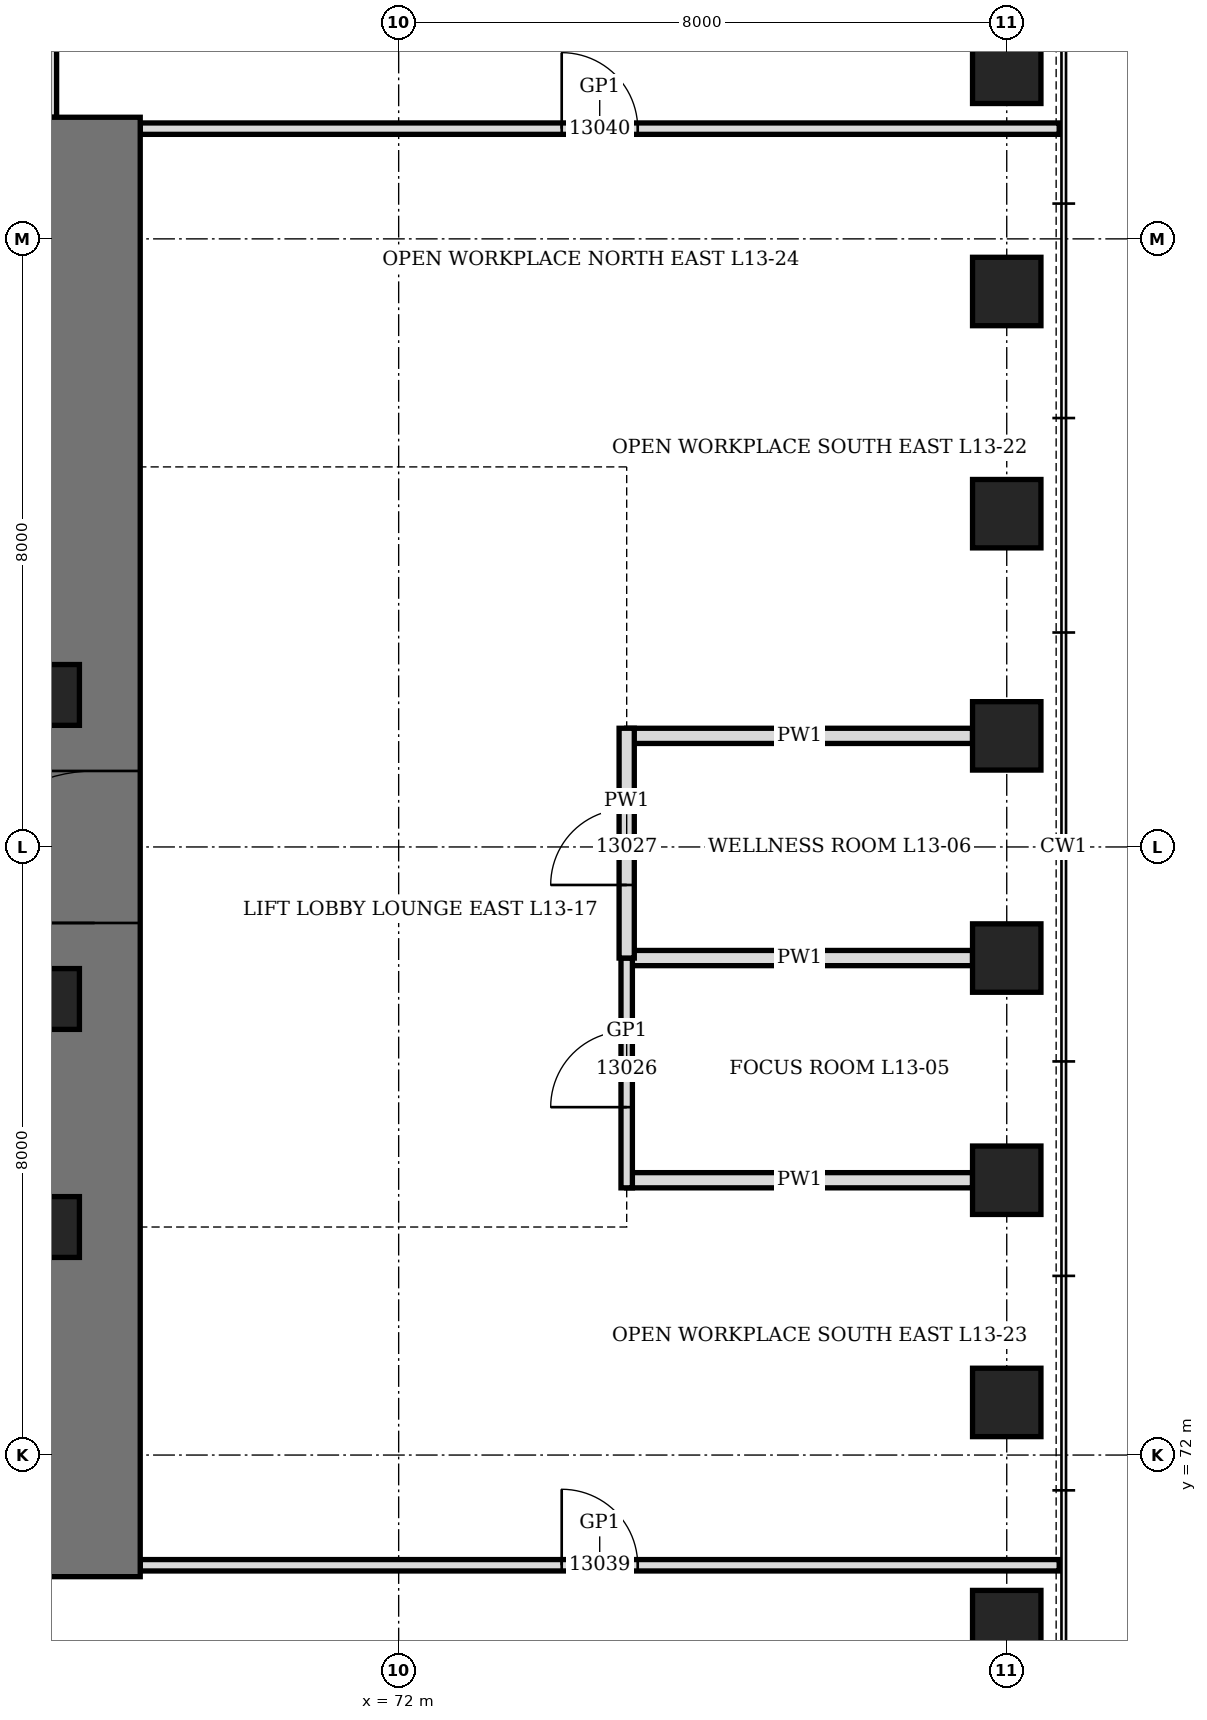
"""IFC4 building model, lengths in metres.
Left out: names, types, materials, properties, quantities, classifications, styles, units other than length and angle.
Written with IfcOpenShell. Run it as: python <this file> out.ifc"""

import sys

from ifc_helpers import new_model, si_unit, direction, frame, frame_2d, origin, origin_2d, place, context, subcontext, project, spatial, rectangle, hollow_rectangle, extrude, element, fill, save


model = new_model("IFC4")
c1 = context("Model", 3, precision=1e-05, world=origin(), true_north=direction((0.0, 1.0)))
c2 = subcontext(c1, "Body", "Model", "MODEL_VIEW")
j1 = project(units=[si_unit("LENGTHUNIT", "METRE"), si_unit("PLANEANGLEUNIT", "RADIAN")], contexts=[c1])
p1 = place(None, origin())
s1 = spatial("IfcSite", under=j1, at=p1, CompositionType="ELEMENT")
p2 = place(p1, origin())
s2 = spatial("IfcBuilding", under=s1, at=p2, CompositionType="ELEMENT")
p3 = place(p2, frame((0.0, 0.0, 64.3)))
s3 = spatial("IfcBuildingStorey", under=s2, at=p3, CompositionType="ELEMENT", Elevation=64.3)
for number, where, z_axis, x_axis in (
    (1, (80.0, 69.769, 0.0), (0.0, 0.0, 1.0), (0.0, 1.0, 0.0)),
    (2, (80.0, 72.692, 0.0), (0.0, 0.0, 1.0), (0.0, 1.0, 0.0)),
    (3, (80.0, 75.615, 0.0), (0.0, 0.0, 1.0), (0.0, 1.0, 0.0)),
    (4, (80.0, 78.539, 0.0), (0.0, 0.0, 1.0), (0.0, 1.0, 0.0)),
    (5, (80.0, 81.461, 0.0), (0.0, 0.0, 1.0), (0.0, 1.0, 0.0)),
    (6, (80.0, 84.385, 0.0), (0.0, 0.0, 1.0), (0.0, 1.0, 0.0)),
    (7, (80.0, 87.308, 0.0), (0.0, 0.0, 1.0), (0.0, 1.0, 0.0)),
    (8, (80.0, 90.231, 0.0), (0.0, 0.0, 1.0), (0.0, 1.0, 0.0)),
):
    element("IfcColumn", number, at=place(p3, frame(where, z_axis=z_axis, x_axis=x_axis)), inside=s3, PredefinedType="COLUMN", context=c2, shape_type="SweptSolid", body=[
        extrude(hollow_rectangle(XDim=0.9, YDim=0.9, WallThickness=0.12, at=origin_2d()), origin(), (0.0, 0.0, 1.0), 4.2),
    ])
p4 = place(p3, frame((68.0, 70.4, 0.0), z_axis=(0.0, 0.0, 1.0), x_axis=(0.0, 1.0, 0.0)))
e9 = element("IfcWall", 9, at=p4, inside=s3, PredefinedType="SHEAR", context=c2, shape_type="SweptSolid", body=[
    extrude(rectangle(XDim=19.2, YDim=1.2, at=frame_2d((9.6, 0.0))), origin(), (0.0, 0.0, 1.0), 4.2),
])
p5 = place(p4, frame((8.6, 0.0, 0.0)))
e10 = element("IfcOpeningElement", 10, at=p5, cuts=e9, PredefinedType="OPENING", context=c2, shape_type="SweptSolid", body=[
    extrude(rectangle(XDim=2.0, YDim=2.4, at=frame_2d((1.0, 1.2))), frame((0.0, 0.61, 0.0), z_axis=(0.0, -1.0, 0.0), x_axis=(1.0, 0.0, 0.0)), (0.0, 0.0, 1.0), 1.22),
])
for number, where, z_axis, x_axis in (
    (11, (67.4, 75.0, 0.0), (0.0, 0.0, 1.0), (1.0, 0.0, 0.0)),
    (12, (67.4, 78.0, 0.0), (0.0, 0.0, 1.0), (1.0, 0.0, 0.0)),
    (13, (67.4, 82.0, 0.0), (0.0, 0.0, 1.0), (1.0, 0.0, 0.0)),
):
    element("IfcColumn", number, at=place(p3, frame(where, z_axis=z_axis, x_axis=x_axis)), inside=s3, PredefinedType="COLUMN", context=c2, shape_type="SweptSolid", body=[
        extrude(hollow_rectangle(XDim=0.8, YDim=0.8, WallThickness=0.1, at=origin_2d()), origin(), (0.0, 0.0, 1.0), 4.2),
    ])
for number, where, z_axis, x_axis in (
    (14, (75.0, 75.615, 0.0), (0.0, 0.0, 1.0), (1.0, 0.0, 0.0)),
    (15, (75.0, 78.539, 0.0), (0.0, 0.0, 1.0), (1.0, 0.0, 0.0)),
    (16, (75.0, 81.461, 0.0), (0.0, 0.0, 1.0), (1.0, 0.0, 0.0)),
):
    element("IfcWall", number, at=place(p3, frame(where, z_axis=z_axis, x_axis=x_axis)), inside=s3, PredefinedType="PARTITIONING", context=c2, shape_type="SweptSolid", body=[
        extrude(rectangle(XDim=4.55, YDim=0.2, at=frame_2d((2.275, 0.0))), origin(), (0.0, 0.0, 1.0), 3.428),
    ])
p6 = place(p3, frame((67.4, 89.6, 0.0), z_axis=(0.0, 0.0, 1.0), x_axis=(0.0, 1.0, 0.0)))
e17 = element("IfcWall", 17, at=p6, inside=s3, PredefinedType="PARTITIONING", context=c2, shape_type="SweptSolid", body=[
    extrude(rectangle(XDim=3.0, YDim=0.2, at=frame_2d((1.5, 0.0))), origin(), (0.0, 0.0, 1.0), 4.04),
])
p7 = place(p3, frame((68.6, 70.55, 0.0), z_axis=(0.0, 0.0, 1.0), x_axis=(1.0, 0.0, 0.0)))
e18 = element("IfcWall", 18, at=p7, inside=s3, PredefinedType="PARTITIONING", context=c2, shape_type="SweptSolid", body=[
    extrude(rectangle(XDim=12.09, YDim=0.15, at=frame_2d((6.045, 0.0))), origin(), (0.0, 0.0, 1.0), 4.04),
])
p8 = place(p7, frame((5.545, 0.0, 0.0)))
e19 = element("IfcOpeningElement", 19, at=p8, cuts=e18, PredefinedType="OPENING", context=c2, shape_type="SweptSolid", body=[
    extrude(rectangle(XDim=1.0, YDim=2.4, at=frame_2d((0.5, 1.2))), frame((0.0, 0.085, 0.0), z_axis=(0.0, -1.0, 0.0), x_axis=(1.0, 0.0, 0.0)), (0.0, 0.0, 1.0), 0.17),
])
p9 = place(p3, frame((68.6, 89.45, 0.0), z_axis=(0.0, 0.0, 1.0), x_axis=(1.0, 0.0, 0.0)))
e20 = element("IfcWall", 20, at=p9, inside=s3, PredefinedType="PARTITIONING", context=c2, shape_type="SweptSolid", body=[
    extrude(rectangle(XDim=12.09, YDim=0.15, at=frame_2d((6.045, 0.0))), origin(), (0.0, 0.0, 1.0), 4.04),
])
p10 = place(p9, frame((5.545, 0.0, 0.0)))
e21 = element("IfcOpeningElement", 21, at=p10, cuts=e20, PredefinedType="OPENING", context=c2, shape_type="SweptSolid", body=[
    extrude(rectangle(XDim=1.0, YDim=2.4, at=frame_2d((0.5, 1.2))), frame((0.0, 0.085, 0.0), z_axis=(0.0, -1.0, 0.0), x_axis=(1.0, 0.0, 0.0)), (0.0, 0.0, 1.0), 0.17),
])
p11 = place(p3, frame((75.0, 75.515, 0.0), z_axis=(0.0, 0.0, 1.0), x_axis=(0.0, 1.0, 0.0)))
e22 = element("IfcWall", 22, at=p11, inside=s3, PredefinedType="PARTITIONING", context=c2, shape_type="SweptSolid", body=[
    extrude(rectangle(XDim=3.023, YDim=0.15, at=frame_2d((1.512, 0.0))), origin(), (0.0, 0.0, 1.0), 4.04),
])
p12 = place(p11, frame((1.062, 0.0, 0.0)))
e23 = element("IfcOpeningElement", 23, at=p12, cuts=e22, PredefinedType="OPENING", context=c2, shape_type="SweptSolid", body=[
    extrude(rectangle(XDim=1.0, YDim=2.4, at=frame_2d((0.5, 1.2))), frame((0.0, 0.085, 0.0), z_axis=(0.0, -1.0, 0.0), x_axis=(1.0, 0.0, 0.0)), (0.0, 0.0, 1.0), 0.17),
])
p13 = place(p3, frame((75.0, 78.539, 0.0), z_axis=(0.0, 0.0, 1.0), x_axis=(0.0, 1.0, 0.0)))
e24 = element("IfcWall", 24, at=p13, inside=s3, PredefinedType="PARTITIONING", context=c2, shape_type="SweptSolid", body=[
    extrude(rectangle(XDim=3.023, YDim=0.2, at=frame_2d((1.511, 0.0))), origin(), (0.0, 0.0, 1.0), 4.04),
])
p14 = place(p13, frame((0.961, 0.0, 0.0)))
e25 = element("IfcOpeningElement", 25, at=p14, cuts=e24, PredefinedType="OPENING", context=c2, shape_type="SweptSolid", body=[
    extrude(rectangle(XDim=1.0, YDim=2.1, at=frame_2d((0.5, 1.05))), frame((0.0, 0.11, 0.0), z_axis=(0.0, -1.0, 0.0), x_axis=(1.0, 0.0, 0.0)), (0.0, 0.0, 1.0), 0.22),
])
p15 = place(p5, origin())
e26 = element("IfcDoor", 26, at=p15, inside=s3, OperationType="DOUBLE_DOOR_SINGLE_SWING", PredefinedType="DOOR", context=c2, shape_type="SweptSolid", body=[
    extrude(rectangle(XDim=2.0, YDim=2.4, at=frame_2d((1.0, 1.2))), frame((0.0, 0.35, 0.0), z_axis=(0.0, -1.0, 0.0), x_axis=(1.0, 0.0, 0.0)), (0.0, 0.0, 1.0), 0.7),
])
fill(e10, e26)
p16 = place(p12, origin())
e27 = element("IfcDoor", 27, at=p16, inside=s3, OperationType="SINGLE_SWING_RIGHT", PredefinedType="DOOR", context=c2, shape_type="SweptSolid", body=[
    extrude(rectangle(XDim=1.0, YDim=2.4, at=frame_2d((0.5, 1.2))), frame((0.0, 0.075, 0.0), z_axis=(0.0, -1.0, 0.0), x_axis=(1.0, 0.0, 0.0)), (0.0, 0.0, 1.0), 0.149),
])
fill(e23, e27)
p17 = place(p14, origin())
e28 = element("IfcDoor", 28, at=p17, inside=s3, OperationType="SINGLE_SWING_LEFT", PredefinedType="DOOR", context=c2, shape_type="SweptSolid", body=[
    extrude(rectangle(XDim=1.0, YDim=2.1, at=frame_2d((0.5, 1.05))), frame((0.0, 0.1, 0.0), z_axis=(0.0, -1.0, 0.0), x_axis=(1.0, 0.0, 0.0)), (0.0, 0.0, 1.0), 0.199),
])
fill(e25, e28)
p18 = place(p8, origin())
e29 = element("IfcDoor", 29, at=p18, inside=s3, OperationType="SINGLE_SWING_RIGHT", PredefinedType="DOOR", context=c2, shape_type="SweptSolid", body=[
    extrude(rectangle(XDim=1.0, YDim=2.4, at=frame_2d((0.5, 1.2))), frame((0.0, 0.075, 0.0), z_axis=(0.0, -1.0, 0.0), x_axis=(1.0, 0.0, 0.0)), (0.0, 0.0, 1.0), 0.149),
])
fill(e19, e29)
p19 = place(p10, origin())
e30 = element("IfcDoor", 30, at=p19, inside=s3, OperationType="SINGLE_SWING_RIGHT", PredefinedType="DOOR", context=c2, shape_type="SweptSolid", body=[
    extrude(rectangle(XDim=1.0, YDim=2.4, at=frame_2d((0.5, 1.2))), frame((0.0, 0.075, 0.0), z_axis=(0.0, -1.0, 0.0), x_axis=(1.0, 0.0, 0.0)), (0.0, 0.0, 1.0), 0.149),
])
fill(e21, e30)
save(model, sys.argv[1])
